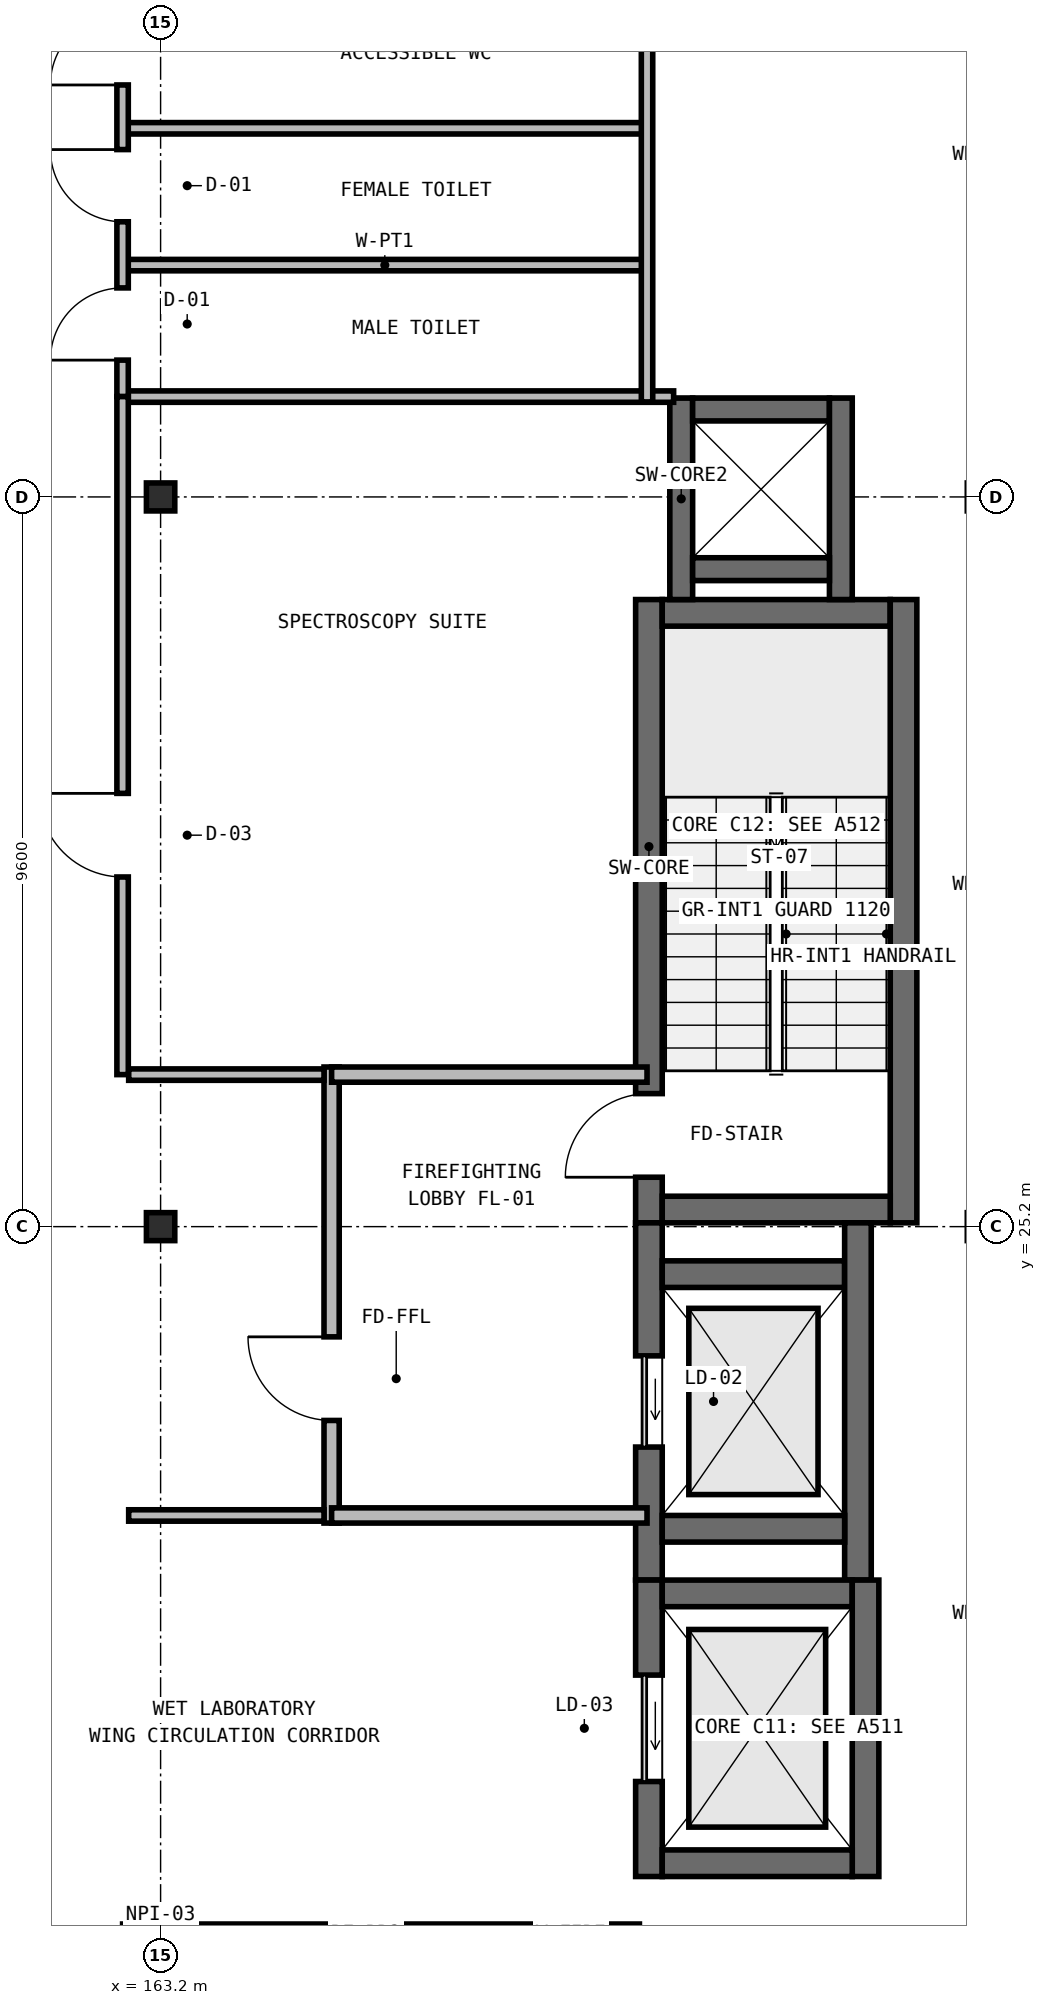
"""IFC4 building model, lengths in metres.
Left out: names, types, materials, properties, quantities, classifications, styles, units other than length and angle.
Written with IfcOpenShell. Run it as: python <this file> out.ifc"""

import sys

from ifc_helpers import new_model, si_unit, direction, frame, frame_2d, origin, origin_2d, place, context, subcontext, project, spatial, rectangle, i_section, extrude, element, fill, save


model = new_model("IFC4")
c1 = context("Model", 3, precision=1e-05, world=origin(), true_north=direction((0.0, 1.0)))
c2 = subcontext(c1, "Body", "Model", "MODEL_VIEW")
j1 = project(units=[si_unit("LENGTHUNIT", "METRE"), si_unit("PLANEANGLEUNIT", "RADIAN")], contexts=[c1])
p1 = place(None, origin())
s1 = spatial("IfcSite", under=j1, at=p1, CompositionType="ELEMENT")
p2 = place(p1, origin())
s2 = spatial("IfcBuilding", under=s1, at=p2, CompositionType="ELEMENT")
p3 = place(p2, frame((0.0, 0.0, 18.9)))
s3 = spatial("IfcBuildingStorey", under=s2, at=p3, CompositionType="ELEMENT", Elevation=18.9)
p4 = place(p3, frame((169.625, 25.25, 0.0), z_axis=(0.0, 0.0, 1.0), x_axis=(0.0, 1.0, 0.0)))
e1 = element("IfcWall", 1, at=p4, inside=s3, PredefinedType="SHEAR", context=c2, shape_type="SweptSolid", body=[
    extrude(rectangle(XDim=8.2, YDim=0.35, at=frame_2d((4.1, 0.0))), origin(), (0.0, 0.0, 1.0), 4.55),
])
p5 = place(p4, frame((0.6, 0.0, 0.0)))
e2 = element("IfcOpeningElement", 2, at=p5, cuts=e1, PredefinedType="OPENING", context=c2, shape_type="SweptSolid", body=[
    extrude(rectangle(XDim=1.1, YDim=2.15, at=frame_2d((0.55, 1.075))), frame((0.0, 0.185, 0.0), z_axis=(0.0, -1.0, 0.0), x_axis=(1.0, 0.0, 0.0)), (0.0, 0.0, 1.0), 0.37),
])
p6 = place(p3, frame((169.8, 33.275, 0.0), z_axis=(0.0, 0.0, 1.0), x_axis=(1.0, 0.0, 0.0)))
e3 = element("IfcWall", 3, at=p6, inside=s3, PredefinedType="SHEAR", context=c2, shape_type="SweptSolid", body=[
    extrude(rectangle(XDim=3.0, YDim=0.35, at=frame_2d((1.5, 0.0))), origin(), (0.0, 0.0, 1.0), 4.55),
])
p7 = place(p3, frame((172.975, 33.45, 0.0), z_axis=(0.0, 0.0, 1.0), x_axis=(0.0, -1.0, 0.0)))
e4 = element("IfcWall", 4, at=p7, inside=s3, PredefinedType="SHEAR", context=c2, shape_type="SweptSolid", body=[
    extrude(rectangle(XDim=8.2, YDim=0.35, at=frame_2d((4.1, 0.0))), origin(), (0.0, 0.0, 1.0), 4.55),
])
p8 = place(p3, frame((172.8, 25.425, 0.0), z_axis=(0.0, 0.0, 1.0), x_axis=(-1.0, 0.0, 0.0)))
e5 = element("IfcWall", 5, at=p8, inside=s3, PredefinedType="SHEAR", context=c2, shape_type="SweptSolid", body=[
    extrude(rectangle(XDim=3.0, YDim=0.35, at=frame_2d((1.5, 0.0))), origin(), (0.0, 0.0, 1.0), 4.55),
])
p9 = place(p3, frame((169.625, 20.55, 0.0), z_axis=(0.0, 0.0, 1.0), x_axis=(0.0, 1.0, 0.0)))
e6 = element("IfcWall", 6, at=p9, inside=s3, PredefinedType="SHEAR", context=c2, shape_type="SweptSolid", body=[
    extrude(rectangle(XDim=4.7, YDim=0.35, at=frame_2d((2.35, 0.0))), origin(), (0.0, 0.0, 1.0), 4.55),
])
p10 = place(p9, frame((1.75, 0.0, 0.0)))
e7 = element("IfcOpeningElement", 7, at=p10, cuts=e6, PredefinedType="OPENING", context=c2, shape_type="SweptSolid", body=[
    extrude(rectangle(XDim=1.2, YDim=2.15, at=frame_2d((0.6, 1.075))), frame((0.0, 0.185, 0.0), z_axis=(0.0, -1.0, 0.0), x_axis=(1.0, 0.0, 0.0)), (0.0, 0.0, 1.0), 0.37),
])
p11 = place(p3, frame((169.8, 24.575, 0.0), z_axis=(0.0, 0.0, 1.0), x_axis=(1.0, 0.0, 0.0)))
e8 = element("IfcWall", 8, at=p11, inside=s3, PredefinedType="SHEAR", context=c2, shape_type="SweptSolid", body=[
    extrude(rectangle(XDim=2.4, YDim=0.35, at=frame_2d((1.2, 0.0))), origin(), (0.0, 0.0, 1.0), 4.55),
])
p12 = place(p3, frame((172.375, 25.25, 0.0), z_axis=(0.0, 0.0, 1.0), x_axis=(0.0, -1.0, 0.0)))
e9 = element("IfcWall", 9, at=p12, inside=s3, PredefinedType="SHEAR", context=c2, shape_type="SweptSolid", body=[
    extrude(rectangle(XDim=4.7, YDim=0.35, at=frame_2d((2.35, 0.0))), origin(), (0.0, 0.0, 1.0), 4.55),
])
p13 = place(p3, frame((172.2, 21.225, 0.0), z_axis=(0.0, 0.0, 1.0), x_axis=(-1.0, 0.0, 0.0)))
e10 = element("IfcWall", 10, at=p13, inside=s3, PredefinedType="SHEAR", context=c2, shape_type="SweptSolid", body=[
    extrude(rectangle(XDim=2.4, YDim=0.35, at=frame_2d((1.2, 0.0))), origin(), (0.0, 0.0, 1.0), 4.55),
])
p14 = place(p3, frame((169.625, 16.65, 0.0), z_axis=(0.0, 0.0, 1.0), x_axis=(0.0, 1.0, 0.0)))
e11 = element("IfcWall", 11, at=p14, inside=s3, PredefinedType="SHEAR", context=c2, shape_type="SweptSolid", body=[
    extrude(rectangle(XDim=3.9, YDim=0.35, at=frame_2d((1.95, 0.0))), origin(), (0.0, 0.0, 1.0), 4.55),
])
p15 = place(p14, frame((1.25, 0.0, 0.0)))
e12 = element("IfcOpeningElement", 12, at=p15, cuts=e11, PredefinedType="OPENING", context=c2, shape_type="SweptSolid", body=[
    extrude(rectangle(XDim=1.4, YDim=2.3, at=frame_2d((0.7, 1.15))), frame((0.0, 0.185, 0.0), z_axis=(0.0, -1.0, 0.0), x_axis=(1.0, 0.0, 0.0)), (0.0, 0.0, 1.0), 0.37),
])
p16 = place(p3, frame((169.8, 20.375, 0.0), z_axis=(0.0, 0.0, 1.0), x_axis=(1.0, 0.0, 0.0)))
e13 = element("IfcWall", 13, at=p16, inside=s3, PredefinedType="SHEAR", context=c2, shape_type="SweptSolid", body=[
    extrude(rectangle(XDim=2.5, YDim=0.35, at=frame_2d((1.25, 0.0))), origin(), (0.0, 0.0, 1.0), 4.55),
])
p17 = place(p3, frame((172.475, 20.55, 0.0), z_axis=(0.0, 0.0, 1.0), x_axis=(0.0, -1.0, 0.0)))
e14 = element("IfcWall", 14, at=p17, inside=s3, PredefinedType="SHEAR", context=c2, shape_type="SweptSolid", body=[
    extrude(rectangle(XDim=3.9, YDim=0.35, at=frame_2d((1.95, 0.0))), origin(), (0.0, 0.0, 1.0), 4.55),
])
p18 = place(p3, frame((172.3, 16.825, 0.0), z_axis=(0.0, 0.0, 1.0), x_axis=(-1.0, 0.0, 0.0)))
e15 = element("IfcWall", 15, at=p18, inside=s3, PredefinedType="SHEAR", context=c2, shape_type="SweptSolid", body=[
    extrude(rectangle(XDim=2.5, YDim=0.35, at=frame_2d((1.25, 0.0))), origin(), (0.0, 0.0, 1.0), 4.55),
])
for number, where, z_axis, x_axis in (
    (16, (163.2, 25.2, 0.0), (0.0, 0.0, 1.0), (1.0, 0.0, 0.0)),
    (17, (163.2, 34.8, 0.0), (0.0, 0.0, 1.0), (1.0, 0.0, 0.0)),
):
    element("IfcColumn", number, at=place(p3, frame(where, z_axis=z_axis, x_axis=x_axis)), inside=s3, PredefinedType="COLUMN", context=c2, shape_type="SweptSolid", body=[
        extrude(i_section(OverallWidth=0.373, OverallDepth=0.368, WebThickness=0.017, FlangeThickness=0.027, at=origin_2d()), origin(), (0.0, 0.0, 1.0), 4.55),
    ])
p19 = place(p3, frame((170.05, 33.45, 0.0), z_axis=(0.0, 0.0, 1.0), x_axis=(0.0, 1.0, 0.0)))
e18 = element("IfcWall", 18, at=p19, inside=s3, PredefinedType="SHEAR", context=c2, shape_type="SweptSolid", body=[
    extrude(rectangle(XDim=2.65, YDim=0.3, at=frame_2d((1.325, 0.0))), origin(), (0.0, 0.0, 1.0), 4.37),
])
p20 = place(p3, frame((170.2, 35.95, 0.0), z_axis=(0.0, 0.0, 1.0), x_axis=(1.0, 0.0, 0.0)))
e19 = element("IfcWall", 19, at=p20, inside=s3, PredefinedType="SHEAR", context=c2, shape_type="SweptSolid", body=[
    extrude(rectangle(XDim=1.8, YDim=0.3, at=frame_2d((0.9, 0.0))), origin(), (0.0, 0.0, 1.0), 4.37),
])
p21 = place(p3, frame((172.15, 36.1, 0.0), z_axis=(0.0, 0.0, 1.0), x_axis=(0.0, -1.0, 0.0)))
e20 = element("IfcWall", 20, at=p21, inside=s3, PredefinedType="SHEAR", context=c2, shape_type="SweptSolid", body=[
    extrude(rectangle(XDim=2.65, YDim=0.3, at=frame_2d((1.325, 0.0))), origin(), (0.0, 0.0, 1.0), 4.37),
])
p22 = place(p3, frame((172.0, 33.85, 0.0), z_axis=(0.0, 0.0, 1.0), x_axis=(-1.0, 0.0, 0.0)))
e21 = element("IfcWall", 21, at=p22, inside=s3, PredefinedType="SHEAR", context=c2, shape_type="SweptSolid", body=[
    extrude(rectangle(XDim=1.8, YDim=0.3, at=frame_2d((0.9, 0.0))), origin(), (0.0, 0.0, 1.0), 4.37),
])
p23 = place(p3, frame((165.45, 21.3, 0.0), z_axis=(0.0, 0.0, 1.0), x_axis=(0.0, 1.0, 0.0)))
e22 = element("IfcWall", 22, at=p23, inside=s3, PredefinedType="SOLIDWALL", context=c2, shape_type="SweptSolid", body=[
    extrude(rectangle(XDim=6.0, YDim=0.2, at=frame_2d((3.0, 0.0))), origin(), (0.0, 0.0, 1.0), 4.3),
])
p24 = place(p23, frame((1.35, 0.0, 0.0)))
e23 = element("IfcOpeningElement", 23, at=p24, cuts=e22, PredefinedType="OPENING", context=c2, shape_type="SweptSolid", body=[
    extrude(rectangle(XDim=1.1, YDim=2.15, at=frame_2d((0.55, 1.075))), frame((0.0, 0.11, 0.0), z_axis=(0.0, -1.0, 0.0), x_axis=(1.0, 0.0, 0.0)), (0.0, 0.0, 1.0), 0.22),
])
for number, where, z_axis, x_axis in (
    (24, (165.45, 21.4, 0.0), (0.0, 0.0, 1.0), (1.0, 0.0, 0.0)),
    (25, (165.45, 27.2, 0.0), (0.0, 0.0, 1.0), (1.0, 0.0, 0.0)),
):
    element("IfcWall", number, at=place(p3, frame(where, z_axis=z_axis, x_axis=x_axis)), inside=s3, PredefinedType="SOLIDWALL", context=c2, shape_type="SweptSolid", body=[
        extrude(rectangle(XDim=4.15, YDim=0.2, at=frame_2d((2.075, 0.0))), origin(), (0.0, 0.0, 1.0), 4.3),
    ])
for number, where, z_axis, x_axis in (
    (26, (162.7, 37.85, 0.0), (0.0, 0.0, 1.0), (1.0, 0.0, 0.0)),
    (27, (162.7, 39.65, 0.0), (0.0, 0.0, 1.0), (1.0, 0.0, 0.0)),
):
    element("IfcWall", number, at=place(p3, frame(where, z_axis=z_axis, x_axis=x_axis)), inside=s3, PredefinedType="PARTITIONING", context=c2, shape_type="SweptSolid", body=[
        extrude(rectangle(XDim=6.9, YDim=0.15, at=frame_2d((3.45, 0.0))), origin(), (0.0, 0.0, 1.0), 4.3),
    ])
p25 = place(p3, frame((162.7, 36.12, 0.0), z_axis=(0.0, 0.0, 1.0), x_axis=(1.0, 0.0, 0.0)))
e28 = element("IfcWall", 28, at=p25, inside=s3, PredefinedType="PARTITIONING", context=c2, shape_type="SweptSolid", body=[
    extrude(rectangle(XDim=7.25, YDim=0.15, at=frame_2d((3.625, 0.0))), origin(), (0.0, 0.0, 1.0), 4.3),
])
p26 = place(p3, frame((169.6, 36.05, 0.0), z_axis=(0.0, 0.0, 1.0), x_axis=(0.0, 1.0, 0.0)))
e29 = element("IfcWall", 29, at=p26, inside=s3, PredefinedType="PARTITIONING", context=c2, shape_type="SweptSolid", body=[
    extrude(rectangle(XDim=5.5, YDim=0.15, at=frame_2d((2.75, 0.0))), origin(), (0.0, 0.0, 1.0), 4.3),
])
p27 = place(p3, frame((162.7, 36.12, 0.0), z_axis=(0.0, 0.0, 1.0), x_axis=(0.0, 1.0, 0.0)))
e30 = element("IfcWall", 30, at=p27, inside=s3, PredefinedType="PARTITIONING", context=c2, shape_type="SweptSolid", body=[
    extrude(rectangle(XDim=5.4, YDim=0.15, at=frame_2d((2.7, 0.0))), origin(), (0.0, 0.0, 1.0), 4.3),
])
p28 = place(p27, frame((0.48, 0.0, 0.0)))
e31 = element("IfcOpeningElement", 31, at=p28, cuts=e30, PredefinedType="OPENING", context=c2, shape_type="SweptSolid", body=[
    extrude(rectangle(XDim=0.95, YDim=2.1, at=frame_2d((0.475, 1.05))), frame((0.0, 0.085, 0.0), z_axis=(0.0, -1.0, 0.0), x_axis=(1.0, 0.0, 0.0)), (0.0, 0.0, 1.0), 0.17),
])
p29 = place(p27, frame((2.3, 0.0, 0.0)))
e32 = element("IfcOpeningElement", 32, at=p29, cuts=e30, PredefinedType="OPENING", context=c2, shape_type="SweptSolid", body=[
    extrude(rectangle(XDim=0.95, YDim=2.1, at=frame_2d((0.475, 1.05))), frame((0.0, 0.085, 0.0), z_axis=(0.0, -1.0, 0.0), x_axis=(1.0, 0.0, 0.0)), (0.0, 0.0, 1.0), 0.17),
])
p30 = place(p27, frame((4.1, 0.0, 0.0)))
e33 = element("IfcOpeningElement", 33, at=p30, cuts=e30, PredefinedType="OPENING", context=c2, shape_type="SweptSolid", body=[
    extrude(rectangle(XDim=0.95, YDim=2.1, at=frame_2d((0.475, 1.05))), frame((0.0, 0.085, 0.0), z_axis=(0.0, -1.0, 0.0), x_axis=(1.0, 0.0, 0.0)), (0.0, 0.0, 1.0), 0.17),
])
p31 = place(p3, frame((162.78, 27.2, 0.0), z_axis=(0.0, 0.0, 1.0), x_axis=(1.0, 0.0, 0.0)))
e34 = element("IfcWall", 34, at=p31, inside=s3, PredefinedType="PARTITIONING", context=c2, shape_type="SweptSolid", body=[
    extrude(rectangle(XDim=2.57, YDim=0.15, at=frame_2d((1.285, 0.0))), origin(), (0.0, 0.0, 1.0), 4.3),
])
p32 = place(p3, frame((162.7, 27.2, 0.0), z_axis=(0.0, 0.0, 1.0), x_axis=(0.0, 1.0, 0.0)))
e35 = element("IfcWall", 35, at=p32, inside=s3, PredefinedType="PARTITIONING", context=c2, shape_type="SweptSolid", body=[
    extrude(rectangle(XDim=8.92, YDim=0.15, at=frame_2d((4.46, 0.0))), origin(), (0.0, 0.0, 1.0), 4.3),
])
p33 = place(p32, frame((2.6, 0.0, 0.0)))
e36 = element("IfcOpeningElement", 36, at=p33, cuts=e35, PredefinedType="OPENING", context=c2, shape_type="SweptSolid", body=[
    extrude(rectangle(XDim=1.1, YDim=2.2, at=frame_2d((0.55, 1.1))), frame((0.0, 0.085, 0.0), z_axis=(0.0, -1.0, 0.0), x_axis=(1.0, 0.0, 0.0)), (0.0, 0.0, 1.0), 0.17),
])
p34 = place(p3, frame((162.78, 21.4, 0.0), z_axis=(0.0, 0.0, 1.0), x_axis=(1.0, 0.0, 0.0)))
e37 = element("IfcWall", 37, at=p34, inside=s3, PredefinedType="PARTITIONING", context=c2, shape_type="SweptSolid", body=[
    extrude(rectangle(XDim=2.57, YDim=0.15, at=frame_2d((1.285, 0.0))), origin(), (0.0, 0.0, 1.0), 4.3),
])
p35 = place(p3, frame((162.7, 15.95, 0.0), z_axis=(0.0, 0.0, 1.0), x_axis=(1.0, 0.0, 0.0)))
e38 = element("IfcWall", 38, at=p35, inside=s3, PredefinedType="PARTITIONING", context=c2, shape_type="SweptSolid", body=[
    extrude(rectangle(XDim=6.8, YDim=0.15, at=frame_2d((3.4, 0.0))), origin(), (0.0, 0.0, 1.0), 4.3),
])
p36 = place(p5, origin())
e39 = element("IfcDoor", 39, at=p36, inside=s3, OperationType="SINGLE_SWING_LEFT", PredefinedType="DOOR", context=c2, shape_type="SweptSolid", body=[
    extrude(rectangle(XDim=1.1, YDim=2.15, at=frame_2d((0.55, 1.075))), frame((0.0, 0.025, 0.0), z_axis=(0.0, -1.0, 0.0), x_axis=(1.0, 0.0, 0.0)), (0.0, 0.0, 1.0), 0.05),
])
fill(e2, e39)
p37 = place(p10, origin())
e40 = element("IfcDoor", 40, at=p37, inside=s3, OperationType="SLIDING_TO_LEFT", PredefinedType="USERDEFINED", context=c2, shape_type="SweptSolid", body=[
    extrude(rectangle(XDim=1.2, YDim=2.15, at=frame_2d((0.6, 1.075))), frame((0.0, 0.025, 0.0), z_axis=(0.0, -1.0, 0.0), x_axis=(1.0, 0.0, 0.0)), (0.0, 0.0, 1.0), 0.05),
])
fill(e7, e40)
p38 = place(p15, origin())
e41 = element("IfcDoor", 41, at=p38, inside=s3, OperationType="SLIDING_TO_LEFT", PredefinedType="USERDEFINED", context=c2, shape_type="SweptSolid", body=[
    extrude(rectangle(XDim=1.4, YDim=2.3, at=frame_2d((0.7, 1.15))), frame((0.0, 0.025, 0.0), z_axis=(0.0, -1.0, 0.0), x_axis=(1.0, 0.0, 0.0)), (0.0, 0.0, 1.0), 0.05),
])
fill(e12, e41)
p39 = place(p24, origin())
e42 = element("IfcDoor", 42, at=p39, inside=s3, OperationType="SINGLE_SWING_RIGHT", PredefinedType="DOOR", context=c2, shape_type="SweptSolid", body=[
    extrude(rectangle(XDim=1.1, YDim=2.15, at=frame_2d((0.55, 1.075))), frame((0.0, 0.025, 0.0), z_axis=(0.0, -1.0, 0.0), x_axis=(1.0, 0.0, 0.0)), (0.0, 0.0, 1.0), 0.05),
])
fill(e23, e42)
p40 = place(p28, origin())
e43 = element("IfcDoor", 43, at=p40, inside=s3, OperationType="SINGLE_SWING_LEFT", PredefinedType="DOOR", context=c2, shape_type="SweptSolid", body=[
    extrude(rectangle(XDim=0.95, YDim=2.1, at=frame_2d((0.475, 1.05))), frame((0.0, 0.025, 0.0), z_axis=(0.0, -1.0, 0.0), x_axis=(1.0, 0.0, 0.0)), (0.0, 0.0, 1.0), 0.05),
])
fill(e31, e43)
p41 = place(p29, origin())
e44 = element("IfcDoor", 44, at=p41, inside=s3, OperationType="SINGLE_SWING_RIGHT", PredefinedType="DOOR", context=c2, shape_type="SweptSolid", body=[
    extrude(rectangle(XDim=0.95, YDim=2.1, at=frame_2d((0.475, 1.05))), frame((0.0, 0.025, 0.0), z_axis=(0.0, -1.0, 0.0), x_axis=(1.0, 0.0, 0.0)), (0.0, 0.0, 1.0), 0.05),
])
fill(e32, e44)
p42 = place(p30, origin())
e45 = element("IfcDoor", 45, at=p42, inside=s3, OperationType="SINGLE_SWING_LEFT", PredefinedType="DOOR", context=c2, shape_type="SweptSolid", body=[
    extrude(rectangle(XDim=0.95, YDim=2.1, at=frame_2d((0.475, 1.05))), frame((0.0, 0.025, 0.0), z_axis=(0.0, -1.0, 0.0), x_axis=(1.0, 0.0, 0.0)), (0.0, 0.0, 1.0), 0.05),
])
fill(e33, e45)
p43 = place(p33, origin())
e46 = element("IfcDoor", 46, at=p43, inside=s3, OperationType="SINGLE_SWING_RIGHT", PredefinedType="DOOR", context=c2, shape_type="SweptSolid", body=[
    extrude(rectangle(XDim=1.1, YDim=2.2, at=frame_2d((0.55, 1.1))), frame((0.0, 0.025, 0.0), z_axis=(0.0, -1.0, 0.0), x_axis=(1.0, 0.0, 0.0)), (0.0, 0.0, 1.0), 0.05),
])
fill(e36, e46)
save(model, sys.argv[1])
